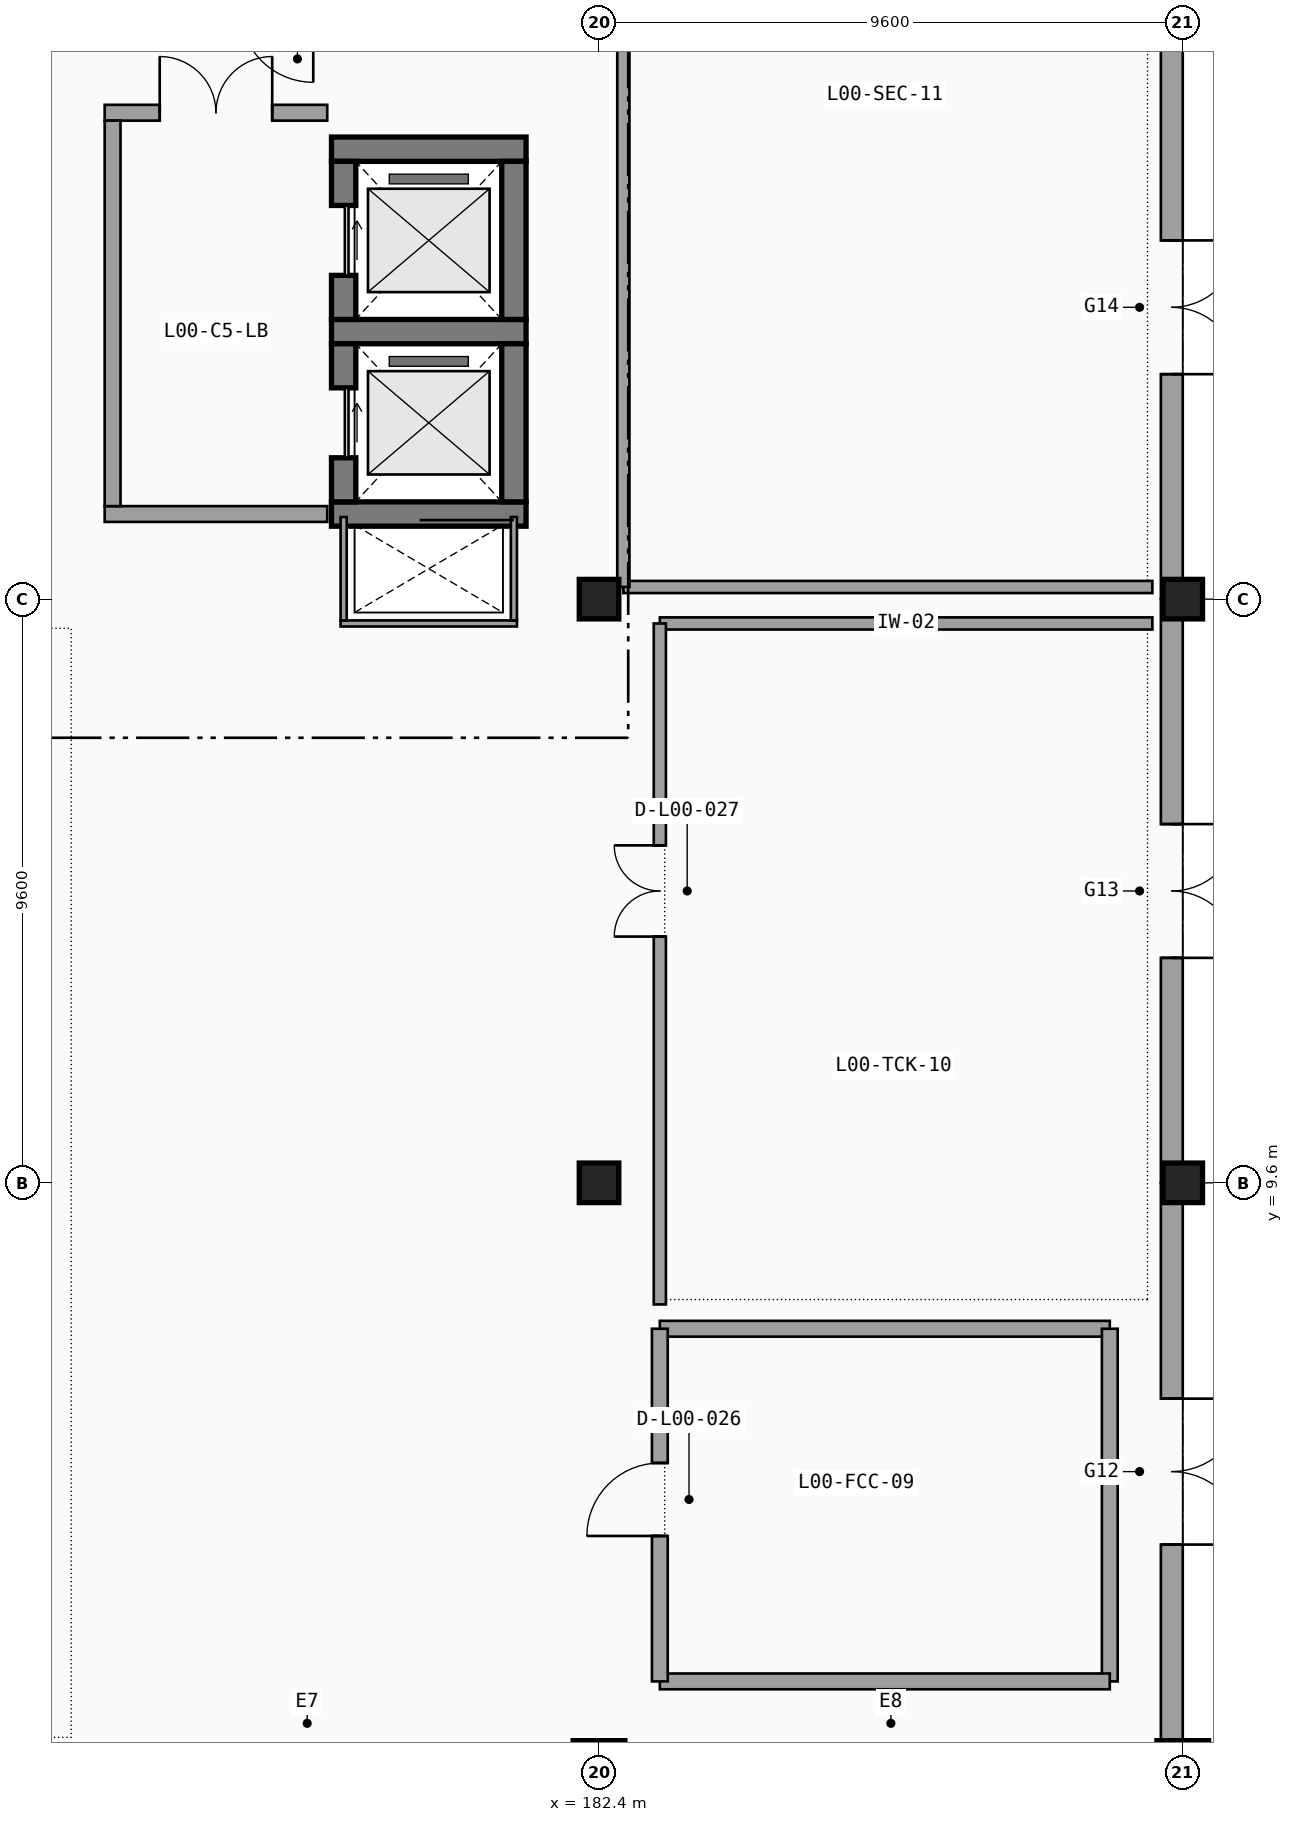
"""IFC4 building model, lengths in metres.
Left out: names, types, materials, properties, quantities, classifications, styles, units other than length and angle.
Written with IfcOpenShell. Run it as: python <this file> out.ifc"""

import sys

from ifc_helpers import new_model, si_unit, direction, frame, frame_2d, origin, origin_2d, place, context, subcontext, project, spatial, rectangle, circle, extrude, element, fill, save


model = new_model("IFC4")
c1 = context("Model", 3, precision=1e-05, world=origin(), true_north=direction((0.0, 1.0)))
c2 = subcontext(c1, "Body", "Model", "MODEL_VIEW")
j1 = project(units=[si_unit("LENGTHUNIT", "METRE"), si_unit("PLANEANGLEUNIT", "RADIAN")], contexts=[c1])
p1 = place(None, origin())
s1 = spatial("IfcSite", under=j1, at=p1, CompositionType="ELEMENT")
p2 = place(p1, origin())
s2 = spatial("IfcBuilding", under=s1, at=p2, CompositionType="ELEMENT")
p3 = place(p2, origin())
s3 = spatial("IfcBuildingStorey", under=s2, at=p3, CompositionType="ELEMENT", Elevation=0.0)
p4 = place(p3, frame((182.4, 0.0, 0.0), z_axis=(0.0, 0.0, 1.0), x_axis=(1.0, 0.0, 0.0)))
e1 = element("IfcColumn", 1, at=p4, inside=s3, PredefinedType="PILASTER", context=c2, shape_type="SweptSolid", body=[
    extrude(circle(Radius=0.425, at=origin_2d()), origin(), (0.0, 0.0, 1.0), 4.8),
])
for number, where, z_axis, x_axis in (
    (2, (182.4, 9.6, 0.0), (0.0, 0.0, 1.0), (1.0, 0.0, 0.0)),
    (3, (182.4, 19.2, 0.0), (0.0, 0.0, 1.0), (1.0, 0.0, 0.0)),
):
    element("IfcColumn", number, at=place(p3, frame(where, z_axis=z_axis, x_axis=x_axis)), inside=s3, PredefinedType="COLUMN", context=c2, shape_type="SweptSolid", body=[
        extrude(rectangle(XDim=0.65, YDim=0.65, at=origin_2d()), origin(), (0.0, 0.0, 1.0), 4.8),
    ])
p5 = place(p3, frame((192.0, 0.0, 0.0), z_axis=(0.0, 0.0, 1.0), x_axis=(1.0, 0.0, 0.0)))
e4 = element("IfcColumn", 4, at=p5, inside=s3, PredefinedType="PILASTER", context=c2, shape_type="SweptSolid", body=[
    extrude(circle(Radius=0.425, at=origin_2d()), origin(), (0.0, 0.0, 1.0), 4.8),
])
for number, where, z_axis, x_axis in (
    (5, (192.0, 9.6, 0.0), (0.0, 0.0, 1.0), (1.0, 0.0, 0.0)),
    (6, (192.0, 19.2, 0.0), (0.0, 0.0, 1.0), (1.0, 0.0, 0.0)),
):
    element("IfcColumn", number, at=place(p3, frame(where, z_axis=z_axis, x_axis=x_axis)), inside=s3, PredefinedType="COLUMN", context=c2, shape_type="SweptSolid", body=[
        extrude(rectangle(XDim=0.65, YDim=0.65, at=origin_2d()), origin(), (0.0, 0.0, 1.0), 4.8),
    ])
p6 = place(p3, frame((191.82, 0.405, 0.0), z_axis=(0.0, 0.0, 1.0), x_axis=(0.0, 1.0, 0.0)))
e7 = element("IfcWall", 7, at=p6, inside=s3, PredefinedType="SOLIDWALL", context=c2, shape_type="SweptSolid", body=[
    extrude(rectangle(XDim=9.195, YDim=0.36, at=frame_2d((4.598, 0.0))), origin(), (0.0, 0.0, 1.0), 3.75),
])
p7 = place(p6, frame((5.645, 0.0, 0.0), z_axis=(0.0, 0.0, 1.0), x_axis=(-1.0, 0.0, 0.0)))
e8 = element("IfcOpeningElement", 8, at=p7, cuts=e7, PredefinedType="OPENING", context=c2, shape_type="SweptSolid", body=[
    extrude(rectangle(XDim=2.4, YDim=2.4, at=frame_2d((1.2, 1.2))), frame((0.0, 0.19, 0.0), z_axis=(0.0, -1.0, 0.0), x_axis=(1.0, 0.0, 0.0)), (0.0, 0.0, 1.0), 0.38),
])
p8 = place(p3, frame((191.82, 9.6, 0.0), z_axis=(0.0, 0.0, 1.0), x_axis=(0.0, 1.0, 0.0)))
e9 = element("IfcWall", 9, at=p8, inside=s3, PredefinedType="SOLIDWALL", context=c2, shape_type="SweptSolid", body=[
    extrude(rectangle(XDim=9.6, YDim=0.36, at=frame_2d((4.8, 0.0))), origin(), (0.0, 0.0, 1.0), 3.75),
])
p9 = place(p8, frame((5.9, 0.0, 0.0), z_axis=(0.0, 0.0, 1.0), x_axis=(-1.0, 0.0, 0.0)))
e10 = element("IfcOpeningElement", 10, at=p9, cuts=e9, PredefinedType="OPENING", context=c2, shape_type="SweptSolid", body=[
    extrude(rectangle(XDim=2.2, YDim=2.4, at=frame_2d((1.1, 1.2))), frame((0.0, 0.19, 0.0), z_axis=(0.0, -1.0, 0.0), x_axis=(1.0, 0.0, 0.0)), (0.0, 0.0, 1.0), 0.38),
])
p10 = place(p3, frame((191.82, 19.2, 0.0), z_axis=(0.0, 0.0, 1.0), x_axis=(0.0, 1.0, 0.0)))
e11 = element("IfcWall", 11, at=p10, inside=s3, PredefinedType="SOLIDWALL", context=c2, shape_type="SweptSolid", body=[
    extrude(rectangle(XDim=9.6, YDim=0.36, at=frame_2d((4.8, 0.0))), origin(), (0.0, 0.0, 1.0), 3.573),
])
p11 = place(p10, frame((5.9, 0.0, 0.0), z_axis=(0.0, 0.0, 1.0), x_axis=(-1.0, 0.0, 0.0)))
e12 = element("IfcOpeningElement", 12, at=p11, cuts=e11, PredefinedType="OPENING", context=c2, shape_type="SweptSolid", body=[
    extrude(rectangle(XDim=2.2, YDim=2.4, at=frame_2d((1.1, 1.2))), frame((0.0, 0.19, 0.0), z_axis=(0.0, -1.0, 0.0), x_axis=(1.0, 0.0, 0.0)), (0.0, 0.0, 1.0), 0.38),
])
for number, where, z_axis, x_axis in (
    (13, (178.0, 20.6, 0.0), (0.0, 0.0, 1.0), (1.0, 0.0, 0.0)),
    (14, (181.2, 23.6, 0.0), (0.0, 0.0, 1.0), (-1.0, 0.0, 0.0)),
):
    element("IfcWall", number, at=place(p3, frame(where, z_axis=z_axis, x_axis=x_axis)), inside=s3, PredefinedType="SHEAR", context=c2, shape_type="SweptSolid", body=[
        extrude(rectangle(XDim=3.2, YDim=0.4, at=frame_2d((1.6, 0.0))), origin(), (0.0, 0.0, 1.0), 4.5),
    ])
p12 = place(p3, frame((178.2, 23.4, 0.0), z_axis=(0.0, 0.0, 1.0), x_axis=(0.0, -1.0, 0.0)))
e15 = element("IfcWall", 15, at=p12, inside=s3, PredefinedType="SHEAR", context=c2, shape_type="SweptSolid", body=[
    extrude(rectangle(XDim=2.6, YDim=0.4, at=frame_2d((1.3, 0.0))), origin(), (0.0, 0.0, 1.0), 4.5),
])
p13 = place(p12, frame((0.725, 0.0, 0.0), z_axis=(0.0, 0.0, 1.0), x_axis=(1.0, 0.0, 0.0)))
e16 = element("IfcOpeningElement", 16, at=p13, cuts=e15, PredefinedType="OPENING", context=c2, shape_type="SweptSolid", body=[
    extrude(rectangle(XDim=1.15, YDim=2.2, at=frame_2d((0.575, 1.1))), frame((0.0, 0.21, 0.0), z_axis=(0.0, -1.0, 0.0), x_axis=(1.0, 0.0, 0.0)), (0.0, 0.0, 1.0), 0.42),
])
p14 = place(p3, frame((181.0, 20.8, 0.0), z_axis=(0.0, 0.0, 1.0), x_axis=(0.0, 1.0, 0.0)))
e17 = element("IfcWall", 17, at=p14, inside=s3, PredefinedType="SHEAR", context=c2, shape_type="SweptSolid", body=[
    extrude(rectangle(XDim=2.6, YDim=0.4, at=frame_2d((1.3, 0.0))), origin(), (0.0, 0.0, 1.0), 4.5),
])
p15 = place(p3, frame((181.2, 26.6, 0.0), z_axis=(0.0, 0.0, 1.0), x_axis=(-1.0, 0.0, 0.0)))
e18 = element("IfcWall", 18, at=p15, inside=s3, PredefinedType="SHEAR", context=c2, shape_type="SweptSolid", body=[
    extrude(rectangle(XDim=3.2, YDim=0.4, at=frame_2d((1.6, 0.0))), origin(), (0.0, 0.0, 1.0), 4.5),
])
p16 = place(p3, frame((178.2, 26.4, 0.0), z_axis=(0.0, 0.0, 1.0), x_axis=(0.0, -1.0, 0.0)))
e19 = element("IfcWall", 19, at=p16, inside=s3, PredefinedType="SHEAR", context=c2, shape_type="SweptSolid", body=[
    extrude(rectangle(XDim=2.6, YDim=0.4, at=frame_2d((1.3, 0.0))), origin(), (0.0, 0.0, 1.0), 4.5),
])
p17 = place(p16, frame((0.725, 0.0, 0.0), z_axis=(0.0, 0.0, 1.0), x_axis=(1.0, 0.0, 0.0)))
e20 = element("IfcOpeningElement", 20, at=p17, cuts=e19, PredefinedType="OPENING", context=c2, shape_type="SweptSolid", body=[
    extrude(rectangle(XDim=1.15, YDim=2.2, at=frame_2d((0.575, 1.1))), frame((0.0, 0.21, 0.0), z_axis=(0.0, -1.0, 0.0), x_axis=(1.0, 0.0, 0.0)), (0.0, 0.0, 1.0), 0.42),
])
p18 = place(p3, frame((181.0, 23.8, 0.0), z_axis=(0.0, 0.0, 1.0), x_axis=(0.0, 1.0, 0.0)))
e21 = element("IfcWall", 21, at=p18, inside=s3, PredefinedType="SHEAR", context=c2, shape_type="SweptSolid", body=[
    extrude(rectangle(XDim=2.6, YDim=0.4, at=frame_2d((1.3, 0.0))), origin(), (0.0, 0.0, 1.0), 4.5),
])
p19 = place(p3, frame((178.15, 18.8, 0.0), z_axis=(0.0, 0.0, 1.0), x_axis=(1.0, 0.0, 0.0)))
e22 = element("IfcWall", 22, at=p19, inside=s3, PredefinedType="PARTITIONING", context=c2, shape_type="SweptSolid", body=[
    extrude(rectangle(XDim=2.9, YDim=0.1, at=frame_2d((1.45, 0.0))), origin(), (0.0, 0.0, 1.0), 4.5),
])
for number, where, z_axis, x_axis in (
    (23, (178.2, 20.55, 0.0), (0.0, 0.0, 1.0), (0.0, -1.0, 0.0)),
    (24, (181.0, 18.85, 0.0), (0.0, 0.0, 1.0), (0.0, 1.0, 0.0)),
):
    element("IfcWall", number, at=place(p3, frame(where, z_axis=z_axis, x_axis=x_axis)), inside=s3, PredefinedType="PARTITIONING", context=c2, shape_type="SweptSolid", body=[
        extrude(rectangle(XDim=1.7, YDim=0.1, at=frame_2d((0.85, 0.0))), origin(), (0.0, 0.0, 1.0), 4.5),
    ])
p20 = place(p3, frame((174.27, 20.6, 0.0), z_axis=(0.0, 0.0, 1.0), x_axis=(1.0, 0.0, 0.0)))
e25 = element("IfcWall", 25, at=p20, inside=s3, PredefinedType="SOLIDWALL", context=c2, shape_type="SweptSolid", body=[
    extrude(rectangle(XDim=3.66, YDim=0.26, at=frame_2d((1.83, 0.0))), origin(), (0.0, 0.0, 1.0), 4.5),
])
p21 = place(p3, frame((177.93, 27.2, 0.0), z_axis=(0.0, 0.0, 1.0), x_axis=(-1.0, 0.0, 0.0)))
e26 = element("IfcWall", 26, at=p21, inside=s3, PredefinedType="SOLIDWALL", context=c2, shape_type="SweptSolid", body=[
    extrude(rectangle(XDim=3.66, YDim=0.26, at=frame_2d((1.83, 0.0))), origin(), (0.0, 0.0, 1.0), 4.5),
])
p22 = place(p21, frame((2.755, 0.0, 0.0), z_axis=(0.0, 0.0, 1.0), x_axis=(-1.0, 0.0, 0.0)))
e27 = element("IfcOpeningElement", 27, at=p22, cuts=e26, PredefinedType="OPENING", context=c2, shape_type="SweptSolid", body=[
    extrude(rectangle(XDim=1.85, YDim=2.25, at=frame_2d((0.925, 1.125))), frame((0.0, 0.14, 0.0), z_axis=(0.0, -1.0, 0.0), x_axis=(1.0, 0.0, 0.0)), (0.0, 0.0, 1.0), 0.28),
])
p23 = place(p3, frame((174.4, 27.07, 0.0), z_axis=(0.0, 0.0, 1.0), x_axis=(0.0, -1.0, 0.0)))
e28 = element("IfcWall", 28, at=p23, inside=s3, PredefinedType="SOLIDWALL", context=c2, shape_type="SweptSolid", body=[
    extrude(rectangle(XDim=6.34, YDim=0.26, at=frame_2d((3.17, 0.0))), origin(), (0.0, 0.0, 1.0), 4.5),
])
p24 = place(p3, frame((183.4, 7.2, 0.0), z_axis=(0.0, 0.0, 1.0), x_axis=(1.0, 0.0, 0.0)))
e29 = element("IfcWall", 29, at=p24, inside=s3, PredefinedType="SOLIDWALL", context=c2, shape_type="SweptSolid", body=[
    extrude(rectangle(XDim=7.4, YDim=0.26, at=frame_2d((3.7, 0.0))), origin(), (0.0, 0.0, 1.0), 4.5),
])
p25 = place(p3, frame((190.8, 7.2, 0.0), z_axis=(0.0, 0.0, 1.0), x_axis=(0.0, -1.0, 0.0)))
e30 = element("IfcWall", 30, at=p25, inside=s3, PredefinedType="SOLIDWALL", context=c2, shape_type="SweptSolid", body=[
    extrude(rectangle(XDim=5.8, YDim=0.26, at=frame_2d((2.9, 0.0))), origin(), (0.0, 0.0, 1.0), 3.972),
])
p26 = place(p3, frame((190.8, 1.4, 0.0), z_axis=(0.0, 0.0, 1.0), x_axis=(-1.0, 0.0, 0.0)))
e31 = element("IfcWall", 31, at=p26, inside=s3, PredefinedType="SOLIDWALL", context=c2, shape_type="SweptSolid", body=[
    extrude(rectangle(XDim=7.4, YDim=0.26, at=frame_2d((3.7, 0.0))), origin(), (0.0, 0.0, 1.0), 4.5),
])
p27 = place(p3, frame((183.4, 1.4, 0.0), z_axis=(0.0, 0.0, 1.0), x_axis=(0.0, 1.0, 0.0)))
e32 = element("IfcWall", 32, at=p27, inside=s3, PredefinedType="SOLIDWALL", context=c2, shape_type="SweptSolid", body=[
    extrude(rectangle(XDim=5.8, YDim=0.26, at=frame_2d((2.9, 0.0))), origin(), (0.0, 0.0, 1.0), 3.972),
])
p28 = place(p27, frame((2.392, 0.0, 0.0), z_axis=(0.0, 0.0, 1.0), x_axis=(1.0, 0.0, 0.0)))
e33 = element("IfcOpeningElement", 33, at=p28, cuts=e32, PredefinedType="OPENING", context=c2, shape_type="SweptSolid", body=[
    extrude(rectangle(XDim=1.2, YDim=2.2, at=frame_2d((0.6, 1.1))), frame((0.0, 0.14, 0.0), z_axis=(0.0, -1.0, 0.0), x_axis=(1.0, 0.0, 0.0)), (0.0, 0.0, 1.0), 0.28),
])
p29 = place(p3, frame((183.4, 18.8, 0.0), z_axis=(0.0, 0.0, 1.0), x_axis=(1.0, 0.0, 0.0)))
e34 = element("IfcWall", 34, at=p29, inside=s3, PredefinedType="PARTITIONING", context=c2, shape_type="SweptSolid", body=[
    extrude(rectangle(XDim=8.1, YDim=0.2, at=frame_2d((4.05, 0.0))), origin(), (0.0, 0.0, 1.0), 4.5),
])
p30 = place(p3, frame((183.4, 7.6, 0.0), z_axis=(0.0, 0.0, 1.0), x_axis=(0.0, 1.0, 0.0)))
e35 = element("IfcWall", 35, at=p30, inside=s3, PredefinedType="PARTITIONING", context=c2, shape_type="SweptSolid", body=[
    extrude(rectangle(XDim=11.2, YDim=0.2, at=frame_2d((5.6, 0.0))), origin(), (0.0, 0.0, 1.0), 3.664),
])
p31 = place(p30, frame((6.05, 0.0, 0.0), z_axis=(0.0, 0.0, 1.0), x_axis=(1.0, 0.0, 0.0)))
e36 = element("IfcOpeningElement", 36, at=p31, cuts=e35, PredefinedType="OPENING", context=c2, shape_type="SweptSolid", body=[
    extrude(rectangle(XDim=1.5, YDim=2.25, at=frame_2d((0.75, 1.125))), frame((0.0, 0.11, 0.0), z_axis=(0.0, -1.0, 0.0), x_axis=(1.0, 0.0, 0.0)), (0.0, 0.0, 1.0), 0.22),
])
p32 = place(p3, frame((191.5, 19.4, 0.0), z_axis=(0.0, 0.0, 1.0), x_axis=(-1.0, 0.0, 0.0)))
e37 = element("IfcWall", 37, at=p32, inside=s3, PredefinedType="PARTITIONING", context=c2, shape_type="SweptSolid", body=[
    extrude(rectangle(XDim=8.7, YDim=0.2, at=frame_2d((4.35, 0.0))), origin(), (0.0, 0.0, 1.0), 3.75),
])
p33 = place(p3, frame((182.8, 19.4, 0.0), z_axis=(0.0, 0.0, 1.0), x_axis=(0.0, 1.0, 0.0)))
e38 = element("IfcWall", 38, at=p33, inside=s3, PredefinedType="PARTITIONING", context=c2, shape_type="SweptSolid", body=[
    extrude(rectangle(XDim=13.48, YDim=0.2, at=frame_2d((6.74, 0.0))), origin(), (0.0, 0.0, 1.0), 3.664),
])
p34 = place(p7, origin())
e39 = element("IfcDoor", 39, at=p34, inside=s3, OperationType="DOUBLE_DOOR_SINGLE_SWING", PredefinedType="DOOR", context=c2, shape_type="SweptSolid", body=[
    extrude(rectangle(XDim=2.4, YDim=2.4, at=frame_2d((1.2, 1.2))), frame((0.0, 0.025, 0.0), z_axis=(0.0, -1.0, 0.0), x_axis=(1.0, 0.0, 0.0)), (0.0, 0.0, 1.0), 0.05),
])
fill(e8, e39)
p35 = place(p9, origin())
e40 = element("IfcDoor", 40, at=p35, inside=s3, OperationType="DOUBLE_DOOR_SINGLE_SWING", PredefinedType="DOOR", context=c2, shape_type="SweptSolid", body=[
    extrude(rectangle(XDim=2.2, YDim=2.4, at=frame_2d((1.1, 1.2))), frame((0.0, 0.025, 0.0), z_axis=(0.0, -1.0, 0.0), x_axis=(1.0, 0.0, 0.0)), (0.0, 0.0, 1.0), 0.05),
])
fill(e10, e40)
p36 = place(p11, origin())
e41 = element("IfcDoor", 41, at=p36, inside=s3, OperationType="DOUBLE_DOOR_SINGLE_SWING", PredefinedType="DOOR", context=c2, shape_type="SweptSolid", body=[
    extrude(rectangle(XDim=2.2, YDim=2.4, at=frame_2d((1.1, 1.2))), frame((0.0, 0.025, 0.0), z_axis=(0.0, -1.0, 0.0), x_axis=(1.0, 0.0, 0.0)), (0.0, 0.0, 1.0), 0.05),
])
fill(e12, e41)
p37 = place(p13, origin())
e42 = element("IfcDoor", 42, at=p37, inside=s3, OperationType="SLIDING_TO_LEFT", PredefinedType="DOOR", context=c2, shape_type="SweptSolid", body=[
    extrude(rectangle(XDim=1.15, YDim=2.2, at=frame_2d((0.575, 1.1))), frame((0.0, 0.025, 0.0), z_axis=(0.0, -1.0, 0.0), x_axis=(1.0, 0.0, 0.0)), (0.0, 0.0, 1.0), 0.05),
])
fill(e16, e42)
p38 = place(p17, origin())
e43 = element("IfcDoor", 43, at=p38, inside=s3, OperationType="SLIDING_TO_LEFT", PredefinedType="DOOR", context=c2, shape_type="SweptSolid", body=[
    extrude(rectangle(XDim=1.15, YDim=2.2, at=frame_2d((0.575, 1.1))), frame((0.0, 0.025, 0.0), z_axis=(0.0, -1.0, 0.0), x_axis=(1.0, 0.0, 0.0)), (0.0, 0.0, 1.0), 0.05),
])
fill(e20, e43)
p39 = place(p22, origin())
e44 = element("IfcDoor", 44, at=p39, inside=s3, OperationType="DOUBLE_DOOR_SINGLE_SWING", PredefinedType="DOOR", context=c2, shape_type="SweptSolid", body=[
    extrude(rectangle(XDim=1.85, YDim=2.25, at=frame_2d((0.925, 1.125))), frame((0.0, 0.025, 0.0), z_axis=(0.0, -1.0, 0.0), x_axis=(1.0, 0.0, 0.0)), (0.0, 0.0, 1.0), 0.05),
])
fill(e27, e44)
p40 = place(p28, origin())
e45 = element("IfcDoor", 45, at=p40, inside=s3, OperationType="SINGLE_SWING_LEFT", PredefinedType="DOOR", context=c2, shape_type="SweptSolid", body=[
    extrude(rectangle(XDim=1.2, YDim=2.2, at=frame_2d((0.6, 1.1))), frame((0.0, 0.025, 0.0), z_axis=(0.0, -1.0, 0.0), x_axis=(1.0, 0.0, 0.0)), (0.0, 0.0, 1.0), 0.05),
])
fill(e33, e45)
p41 = place(p31, origin())
e46 = element("IfcDoor", 46, at=p41, inside=s3, OperationType="DOUBLE_DOOR_SINGLE_SWING", PredefinedType="DOOR", context=c2, shape_type="SweptSolid", body=[
    extrude(rectangle(XDim=1.5, YDim=2.25, at=frame_2d((0.75, 1.125))), frame((0.0, 0.025, 0.0), z_axis=(0.0, -1.0, 0.0), x_axis=(1.0, 0.0, 0.0)), (0.0, 0.0, 1.0), 0.05),
])
fill(e36, e46)
save(model, sys.argv[1])
